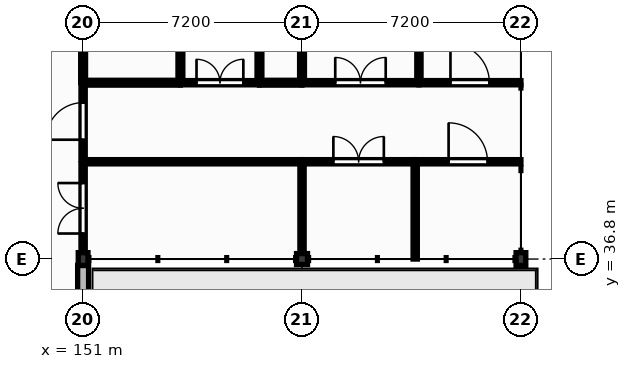
"""IFC4 building model, lengths in metres.
Left out: names, types, materials, properties, quantities, classifications, styles, units other than length and angle.
Written with IfcOpenShell. Run it as: python <this file> out.ifc"""

import sys

from ifc_helpers import new_model, si_unit, direction, frame, frame_2d, origin, origin_2d, place, context, subcontext, project, spatial, rectangle, extrude, element, fill, save


model = new_model("IFC4")
c1 = context("Model", 3, precision=1e-05, world=origin(), true_north=direction((0.0, 1.0)))
c2 = subcontext(c1, "Body", "Model", "MODEL_VIEW")
j1 = project(units=[si_unit("LENGTHUNIT", "METRE"), si_unit("PLANEANGLEUNIT", "RADIAN")], contexts=[c1])
p1 = place(None, origin())
s1 = spatial("IfcSite", under=j1, at=p1, CompositionType="ELEMENT")
p2 = place(p1, origin())
s2 = spatial("IfcBuilding", under=s1, at=p2, CompositionType="ELEMENT")
p3 = place(p2, frame((0.0, 0.0, 4.5)))
s3 = spatial("IfcBuildingStorey", under=s2, at=p3, CompositionType="ELEMENT", Elevation=4.5)
p4 = place(p3, frame((151.0, 36.8, 0.0), z_axis=(0.0, 0.0, 1.0), x_axis=(1.0, 0.0, 0.0)))
e1 = element("IfcColumn", 1, at=p4, inside=s3, PredefinedType="COLUMN", context=c2, shape_type="SweptSolid", body=[
    extrude(rectangle(XDim=0.32, YDim=0.42, at=origin_2d()), origin(), (0.0, 0.0, 1.0), 4.26),
])
p5 = place(p3, frame((158.2, 36.8, 0.0), z_axis=(0.0, 0.0, 1.0), x_axis=(1.0, 0.0, 0.0)))
e2 = element("IfcColumn", 2, at=p5, inside=s3, PredefinedType="COLUMN", context=c2, shape_type="SweptSolid", body=[
    extrude(rectangle(XDim=0.36, YDim=0.36, at=origin_2d()), origin(), (0.0, 0.0, 1.0), 4.26),
])
p6 = place(p3, frame((165.4, 36.8, 0.0), z_axis=(0.0, 0.0, 1.0), x_axis=(1.0, 0.0, 0.0)))
e3 = element("IfcColumn", 3, at=p6, inside=s3, PredefinedType="COLUMN", context=c2, shape_type="SweptSolid", body=[
    extrude(rectangle(XDim=0.32, YDim=0.42, at=origin_2d()), origin(), (0.0, 0.0, 1.0), 4.26),
])
p7 = place(p3, frame((151.0, 27.38, 0.0), z_axis=(0.0, 0.0, 1.0), x_axis=(0.0, 1.0, 0.0)))
e4 = element("IfcWall", 4, at=p7, inside=s3, PredefinedType="SOLIDWALL", context=c2, shape_type="SweptSolid", body=[
    extrude(rectangle(XDim=9.21, YDim=0.36, at=frame_2d((4.605, 0.0))), origin(), (0.0, 0.0, 1.0), 3.8),
])
p8 = place(p7, frame((3.655, 0.0, 0.0)))
e5 = element("IfcOpeningElement", 5, at=p8, cuts=e4, PredefinedType="OPENING", context=c2, shape_type="SweptSolid", body=[
    extrude(rectangle(XDim=1.9, YDim=2.5, at=frame_2d((0.95, 1.25))), frame((0.0, 0.19, 0.0), z_axis=(0.0, -1.0, 0.0), x_axis=(1.0, 0.0, 0.0)), (0.0, 0.0, 1.0), 0.38),
])
p9 = place(p7, frame((0.958, 0.0, 0.9)))
e6 = element("IfcOpeningElement", 6, at=p9, cuts=e4, PredefinedType="OPENING", context=c2, shape_type="SweptSolid", body=[
    extrude(rectangle(XDim=1.8, YDim=2.4, at=frame_2d((0.9, 1.2))), frame((0.0, 0.19, 0.0), z_axis=(0.0, -1.0, 0.0), x_axis=(1.0, 0.0, 0.0)), (0.0, 0.0, 1.0), 0.38),
])
p10 = place(p7, frame((6.377, 0.0, 0.9)))
e7 = element("IfcOpeningElement", 7, at=p10, cuts=e4, PredefinedType="OPENING", context=c2, shape_type="SweptSolid", body=[
    extrude(rectangle(XDim=1.95, YDim=2.4, at=frame_2d((0.975, 1.2))), frame((0.0, 0.19, 0.0), z_axis=(0.0, -1.0, 0.0), x_axis=(1.0, 0.0, 0.0)), (0.0, 0.0, 1.0), 0.38),
])
p11 = place(p3, frame((151.0, 37.01, 0.0), z_axis=(0.0, 0.0, 1.0), x_axis=(0.0, 1.0, 0.0)))
e8 = element("IfcWall", 8, at=p11, inside=s3, PredefinedType="PARTITIONING", context=c2, shape_type="SweptSolid", body=[
    extrude(rectangle(XDim=2.92, YDim=0.14, at=frame_2d((1.46, 0.0))), origin(), (0.0, 0.0, 1.0), 3.62),
])
p12 = place(p11, frame((0.63, 0.0, 0.0)))
e9 = element("IfcOpeningElement", 9, at=p12, cuts=e8, PredefinedType="OPENING", context=c2, shape_type="SweptSolid", body=[
    extrude(rectangle(XDim=1.66, YDim=2.3, at=frame_2d((0.83, 1.15))), frame((0.0, 0.08, 0.0), z_axis=(0.0, -1.0, 0.0), x_axis=(1.0, 0.0, 0.0)), (0.0, 0.0, 1.0), 0.16),
])
p13 = place(p3, frame((151.0, 40.07, 0.0), z_axis=(0.0, 0.0, 1.0), x_axis=(0.0, 1.0, 0.0)))
e10 = element("IfcWall", 10, at=p13, inside=s3, PredefinedType="PARTITIONING", context=c2, shape_type="SweptSolid", body=[
    extrude(rectangle(XDim=2.53, YDim=0.14, at=frame_2d((1.265, 0.0))), origin(), (0.0, 0.0, 1.0), 3.62),
])
p14 = place(p13, frame((0.655, 0.0, 0.0)))
e11 = element("IfcOpeningElement", 11, at=p14, cuts=e10, PredefinedType="OPENING", context=c2, shape_type="SweptSolid", body=[
    extrude(rectangle(XDim=1.22, YDim=2.1, at=frame_2d((0.61, 1.05))), frame((0.0, 0.08, 0.0), z_axis=(0.0, -1.0, 0.0), x_axis=(1.0, 0.0, 0.0)), (0.0, 0.0, 1.0), 0.16),
])
p15 = place(p3, frame((151.0, 40.0, 0.0), z_axis=(0.0, 0.0, 1.0), x_axis=(1.0, 0.0, 0.0)))
e12 = element("IfcWall", 12, at=p15, inside=s3, PredefinedType="PARTITIONING", context=c2, shape_type="SweptSolid", body=[
    extrude(rectangle(XDim=7.2, YDim=0.14, at=frame_2d((3.6, 0.0))), origin(), (0.0, 0.0, 1.0), 4.18),
])
p16 = place(p3, frame((154.2, 42.6, 0.0), z_axis=(0.0, 0.0, 1.0), x_axis=(1.0, 0.0, 0.0)))
e13 = element("IfcWall", 13, at=p16, inside=s3, PredefinedType="PARTITIONING", context=c2, shape_type="SweptSolid", body=[
    extrude(rectangle(XDim=2.6, YDim=0.14, at=frame_2d((1.3, 0.0))), origin(), (0.0, 0.0, 1.0), 4.18),
])
p17 = place(p16, frame((0.53, 0.0, 0.0)))
e14 = element("IfcOpeningElement", 14, at=p17, cuts=e13, PredefinedType="OPENING", context=c2, shape_type="SweptSolid", body=[
    extrude(rectangle(XDim=1.54, YDim=2.25, at=frame_2d((0.77, 1.125))), frame((0.0, 0.08, 0.0), z_axis=(0.0, -1.0, 0.0), x_axis=(1.0, 0.0, 0.0)), (0.0, 0.0, 1.0), 0.16),
])
p18 = place(p3, frame((158.2, 36.98, 0.0), z_axis=(0.0, 0.0, 1.0), x_axis=(0.0, 1.0, 0.0)))
e15 = element("IfcWall", 15, at=p18, inside=s3, PredefinedType="PARTITIONING", context=c2, shape_type="SweptSolid", body=[
    extrude(rectangle(XDim=2.95, YDim=0.14, at=frame_2d((1.475, 0.0))), origin(), (0.0, 0.0, 1.0), 3.62),
])
p19 = place(p3, frame((158.2, 40.0, 0.0), z_axis=(0.0, 0.0, 1.0), x_axis=(1.0, 0.0, 0.0)))
e16 = element("IfcWall", 16, at=p19, inside=s3, PredefinedType="PARTITIONING", context=c2, shape_type="SweptSolid", body=[
    extrude(rectangle(XDim=3.722, YDim=0.14, at=frame_2d((1.861, 0.0))), origin(), (0.0, 0.0, 1.0), 4.18),
])
p20 = place(p19, frame((1.031, 0.0, 0.0)))
e17 = element("IfcOpeningElement", 17, at=p20, cuts=e16, PredefinedType="OPENING", context=c2, shape_type="SweptSolid", body=[
    extrude(rectangle(XDim=1.66, YDim=2.3, at=frame_2d((0.83, 1.15))), frame((0.0, 0.08, 0.0), z_axis=(0.0, -1.0, 0.0), x_axis=(1.0, 0.0, 0.0)), (0.0, 0.0, 1.0), 0.16),
])
p21 = place(p3, frame((158.2, 42.6, 0.0), z_axis=(0.0, 0.0, 1.0), x_axis=(1.0, 0.0, 0.0)))
e18 = element("IfcWall", 18, at=p21, inside=s3, PredefinedType="PARTITIONING", context=c2, shape_type="SweptSolid", body=[
    extrude(rectangle(XDim=3.845, YDim=0.14, at=frame_2d((1.922, 0.0))), origin(), (0.0, 0.0, 1.0), 4.18),
])
p22 = place(p21, frame((1.093, 0.0, 0.0)))
e19 = element("IfcOpeningElement", 19, at=p22, cuts=e18, PredefinedType="OPENING", context=c2, shape_type="SweptSolid", body=[
    extrude(rectangle(XDim=1.66, YDim=2.3, at=frame_2d((0.83, 1.15))), frame((0.0, 0.08, 0.0), z_axis=(0.0, -1.0, 0.0), x_axis=(1.0, 0.0, 0.0)), (0.0, 0.0, 1.0), 0.16),
])
p23 = place(p3, frame((161.922, 36.8, 0.0), z_axis=(0.0, 0.0, 1.0), x_axis=(0.0, 1.0, 0.0)))
e20 = element("IfcWall", 20, at=p23, inside=s3, PredefinedType="PARTITIONING", context=c2, shape_type="SweptSolid", body=[
    extrude(rectangle(XDim=3.13, YDim=0.14, at=frame_2d((1.565, 0.0))), origin(), (0.0, 0.0, 1.0), 4.18),
])
p24 = place(p3, frame((161.922, 40.0, 0.0), z_axis=(0.0, 0.0, 1.0), x_axis=(1.0, 0.0, 0.0)))
e21 = element("IfcWall", 21, at=p24, inside=s3, PredefinedType="PARTITIONING", context=c2, shape_type="SweptSolid", body=[
    extrude(rectangle(XDim=3.478, YDim=0.14, at=frame_2d((1.739, 0.0))), origin(), (0.0, 0.0, 1.0), 4.18),
])
p25 = place(p24, frame((1.099, 0.0, 0.0)))
e22 = element("IfcOpeningElement", 22, at=p25, cuts=e21, PredefinedType="OPENING", context=c2, shape_type="SweptSolid", body=[
    extrude(rectangle(XDim=1.28, YDim=2.2, at=frame_2d((0.64, 1.1))), frame((0.0, 0.08, 0.0), z_axis=(0.0, -1.0, 0.0), x_axis=(1.0, 0.0, 0.0)), (0.0, 0.0, 1.0), 0.16),
])
p26 = place(p3, frame((162.045, 42.67, 0.0), z_axis=(0.0, 0.0, 1.0), x_axis=(0.0, 1.0, 0.0)))
e23 = element("IfcWall", 23, at=p26, inside=s3, PredefinedType="PARTITIONING", context=c2, shape_type="SweptSolid", body=[
    extrude(rectangle(XDim=2.73, YDim=0.14, at=frame_2d((1.365, 0.0))), origin(), (0.0, 0.0, 1.0), 4.18),
])
p27 = place(p3, frame((162.045, 42.6, 0.0), z_axis=(0.0, 0.0, 1.0), x_axis=(1.0, 0.0, 0.0)))
e24 = element("IfcWall", 24, at=p27, inside=s3, PredefinedType="PARTITIONING", context=c2, shape_type="SweptSolid", body=[
    extrude(rectangle(XDim=3.355, YDim=0.14, at=frame_2d((1.677, 0.0))), origin(), (0.0, 0.0, 1.0), 4.18),
])
p28 = place(p27, frame((1.038, 0.0, 0.0)))
e25 = element("IfcOpeningElement", 25, at=p28, cuts=e24, PredefinedType="OPENING", context=c2, shape_type="SweptSolid", body=[
    extrude(rectangle(XDim=1.28, YDim=2.2, at=frame_2d((0.64, 1.1))), frame((0.0, 0.08, 0.0), z_axis=(0.0, -1.0, 0.0), x_axis=(1.0, 0.0, 0.0)), (0.0, 0.0, 1.0), 0.16),
])
p29 = place(p3, frame((151.0, 42.6, 0.0), z_axis=(0.0, 0.0, 1.0), x_axis=(0.0, 1.0, 0.0)))
e26 = element("IfcWall", 26, at=p29, inside=s3, PredefinedType="PARTITIONING", context=c2, shape_type="SweptSolid", body=[
    extrude(rectangle(XDim=2.62, YDim=0.16, at=frame_2d((1.31, 0.0))), origin(), (0.0, 0.0, 1.0), 3.62),
])
p30 = place(p3, frame((158.2, 42.6, 0.0), z_axis=(0.0, 0.0, 1.0), x_axis=(-1.0, 0.0, 0.0)))
e27 = element("IfcWall", 27, at=p30, inside=s3, PredefinedType="PARTITIONING", context=c2, shape_type="SweptSolid", body=[
    extrude(rectangle(XDim=1.4, YDim=0.16, at=frame_2d((0.7, 0.0))), origin(), (0.0, 0.0, 1.0), 4.18),
])
p31 = place(p3, frame((154.2, 42.6, 0.0), z_axis=(0.0, 0.0, 1.0), x_axis=(-1.0, 0.0, 0.0)))
e28 = element("IfcWall", 28, at=p31, inside=s3, PredefinedType="PARTITIONING", context=c2, shape_type="SweptSolid", body=[
    extrude(rectangle(XDim=3.2, YDim=0.16, at=frame_2d((1.6, 0.0))), origin(), (0.0, 0.0, 1.0), 4.18),
])
p32 = place(p3, frame((156.8, 42.67, 0.0), z_axis=(0.0, 0.0, 1.0), x_axis=(0.0, 1.0, 0.0)))
e29 = element("IfcWall", 29, at=p32, inside=s3, PredefinedType="PARTITIONING", context=c2, shape_type="SweptSolid", body=[
    extrude(rectangle(XDim=3.53, YDim=0.16, at=frame_2d((1.765, 0.0))), origin(), (0.0, 0.0, 1.0), 4.18),
])
p33 = place(p3, frame((154.2, 42.67, 0.0), z_axis=(0.0, 0.0, 1.0), x_axis=(0.0, 1.0, 0.0)))
e30 = element("IfcWall", 30, at=p33, inside=s3, PredefinedType="PARTITIONING", context=c2, shape_type="SweptSolid", body=[
    extrude(rectangle(XDim=5.99, YDim=0.16, at=frame_2d((2.995, 0.0))), origin(), (0.0, 0.0, 1.0), 4.18),
])
p34 = place(p3, frame((158.2, 42.67, 0.0), z_axis=(0.0, 0.0, 1.0), x_axis=(0.0, 1.0, 0.0)))
e31 = element("IfcWall", 31, at=p34, inside=s3, PredefinedType="PARTITIONING", context=c2, shape_type="SweptSolid", body=[
    extrude(rectangle(XDim=2.52, YDim=0.16, at=frame_2d((1.26, 0.0))), origin(), (0.0, 0.0, 1.0), 3.62),
])
p35 = place(p14, origin())
e32 = element("IfcDoor", 32, at=p35, inside=s3, OperationType="SINGLE_SWING_LEFT", PredefinedType="DOOR", context=c2, shape_type="SweptSolid", body=[
    extrude(rectangle(XDim=1.22, YDim=2.1, at=frame_2d((0.61, 1.05))), frame((0.0, 0.025, 0.0), z_axis=(0.0, -1.0, 0.0), x_axis=(1.0, 0.0, 0.0)), (0.0, 0.0, 1.0), 0.05),
])
fill(e11, e32)
p36 = place(p17, origin())
e33 = element("IfcDoor", 33, at=p36, inside=s3, OperationType="DOUBLE_DOOR_SINGLE_SWING", PredefinedType="DOOR", context=c2, shape_type="SweptSolid", body=[
    extrude(rectangle(XDim=1.54, YDim=2.25, at=frame_2d((0.77, 1.125))), frame((0.0, 0.025, 0.0), z_axis=(0.0, -1.0, 0.0), x_axis=(1.0, 0.0, 0.0)), (0.0, 0.0, 1.0), 0.05),
])
fill(e14, e33)
p37 = place(p12, origin())
e34 = element("IfcDoor", 34, at=p37, inside=s3, OperationType="DOUBLE_DOOR_SINGLE_SWING", PredefinedType="DOOR", context=c2, shape_type="SweptSolid", body=[
    extrude(rectangle(XDim=1.66, YDim=2.3, at=frame_2d((0.83, 1.15))), frame((0.0, 0.025, 0.0), z_axis=(0.0, -1.0, 0.0), x_axis=(1.0, 0.0, 0.0)), (0.0, 0.0, 1.0), 0.05),
])
fill(e9, e34)
p38 = place(p20, origin())
e35 = element("IfcDoor", 35, at=p38, inside=s3, OperationType="DOUBLE_DOOR_SINGLE_SWING", PredefinedType="DOOR", context=c2, shape_type="SweptSolid", body=[
    extrude(rectangle(XDim=1.66, YDim=2.3, at=frame_2d((0.83, 1.15))), frame((0.0, 0.025, 0.0), z_axis=(0.0, -1.0, 0.0), x_axis=(1.0, 0.0, 0.0)), (0.0, 0.0, 1.0), 0.05),
])
fill(e17, e35)
p39 = place(p25, origin())
e36 = element("IfcDoor", 36, at=p39, inside=s3, OperationType="SINGLE_SWING_LEFT", PredefinedType="DOOR", context=c2, shape_type="SweptSolid", body=[
    extrude(rectangle(XDim=1.28, YDim=2.2, at=frame_2d((0.64, 1.1))), frame((0.0, 0.025, 0.0), z_axis=(0.0, -1.0, 0.0), x_axis=(1.0, 0.0, 0.0)), (0.0, 0.0, 1.0), 0.05),
])
fill(e22, e36)
p40 = place(p22, origin())
e37 = element("IfcDoor", 37, at=p40, inside=s3, OperationType="DOUBLE_DOOR_SINGLE_SWING", PredefinedType="DOOR", context=c2, shape_type="SweptSolid", body=[
    extrude(rectangle(XDim=1.66, YDim=2.3, at=frame_2d((0.83, 1.15))), frame((0.0, 0.025, 0.0), z_axis=(0.0, -1.0, 0.0), x_axis=(1.0, 0.0, 0.0)), (0.0, 0.0, 1.0), 0.05),
])
fill(e19, e37)
p41 = place(p28, origin())
e38 = element("IfcDoor", 38, at=p41, inside=s3, OperationType="SINGLE_SWING_LEFT", PredefinedType="DOOR", context=c2, shape_type="SweptSolid", body=[
    extrude(rectangle(XDim=1.28, YDim=2.2, at=frame_2d((0.64, 1.1))), frame((0.0, 0.025, 0.0), z_axis=(0.0, -1.0, 0.0), x_axis=(1.0, 0.0, 0.0)), (0.0, 0.0, 1.0), 0.05),
])
fill(e25, e38)
save(model, sys.argv[1])
